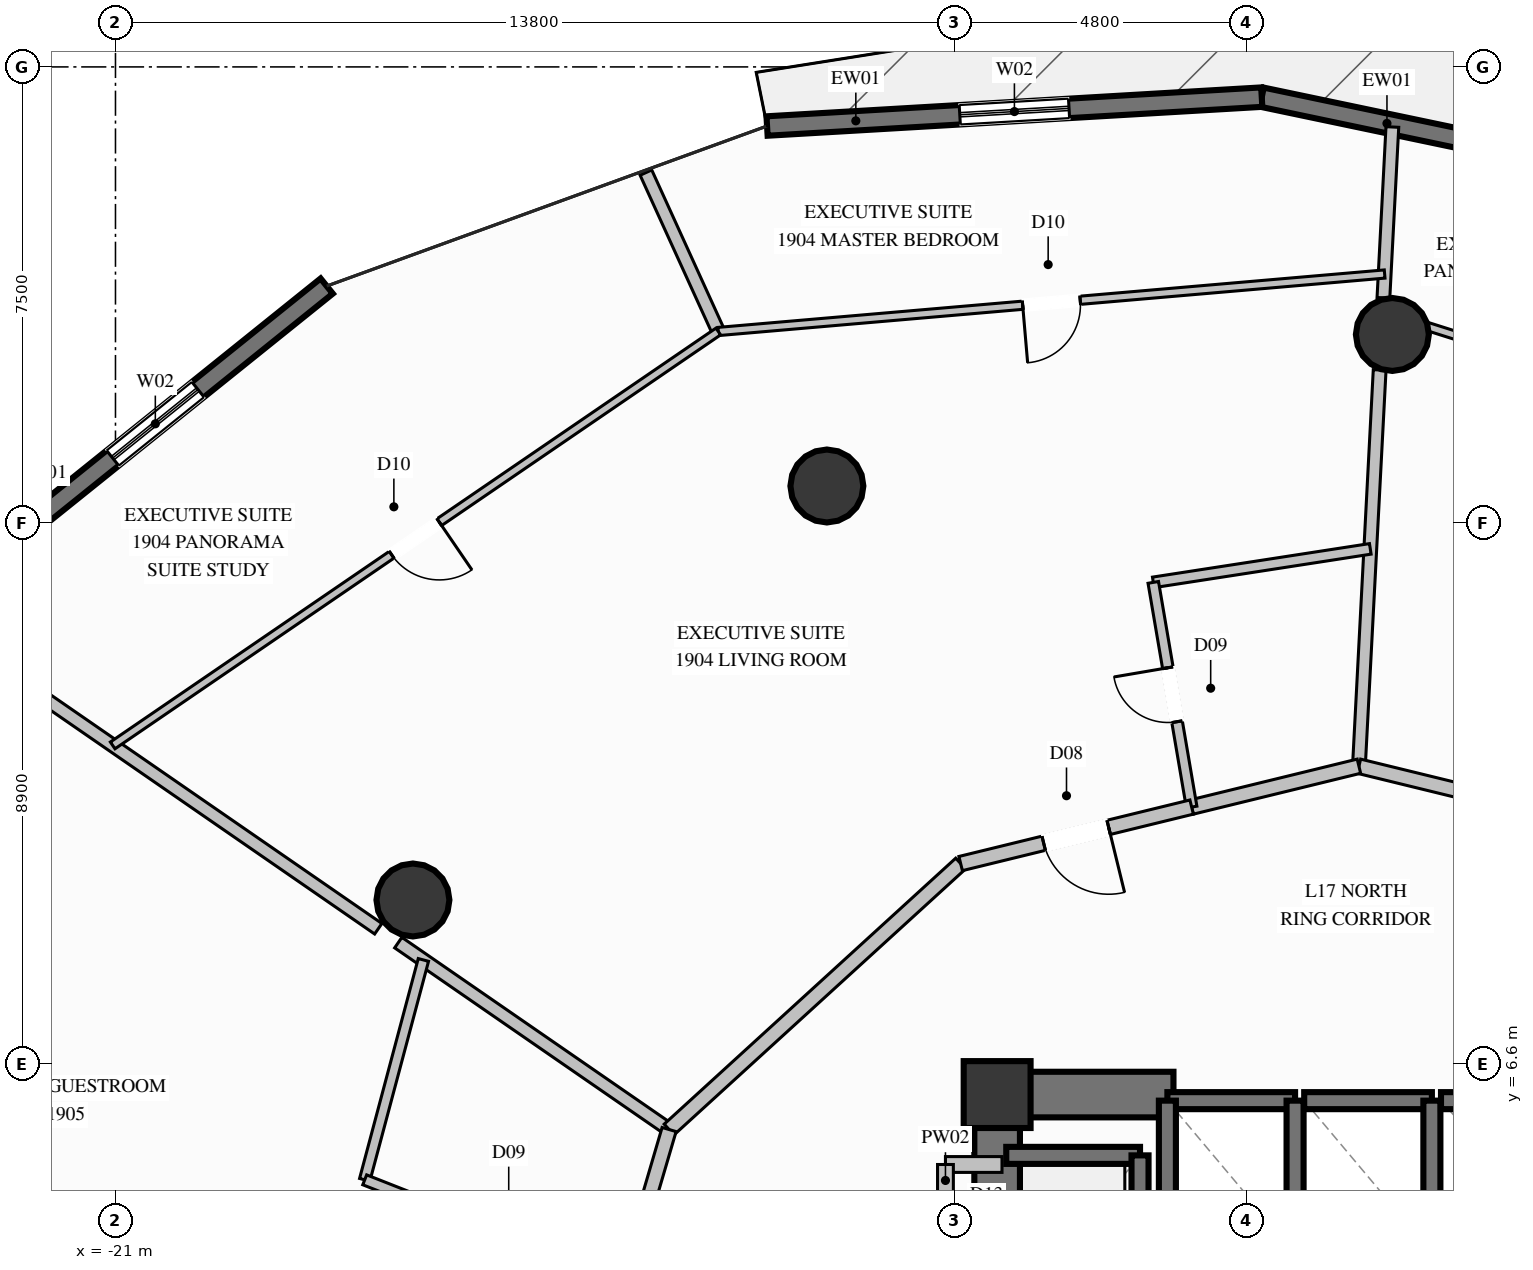
"""IFC4 building model, lengths in metres.
Left out: names, types, materials, properties, quantities, classifications, styles, units other than length and angle.
Written with IfcOpenShell. Run it as: python <this file> out.ifc"""

import sys

from ifc_helpers import new_model, si_unit, direction, frame, frame_2d, origin, origin_2d, place, context, subcontext, project, spatial, rectangle, circle, extrude, element, fill, save


model = new_model("IFC4")
c1 = context("Model", 3, precision=1e-05, world=origin(), true_north=direction((0.0, 1.0)))
c2 = subcontext(c1, "Body", "Model", "MODEL_VIEW")
j1 = project(units=[si_unit("LENGTHUNIT", "METRE"), si_unit("PLANEANGLEUNIT", "RADIAN")], contexts=[c1])
p1 = place(None, origin())
s1 = spatial("IfcSite", under=j1, at=p1, CompositionType="ELEMENT")
p2 = place(p1, origin())
s2 = spatial("IfcBuilding", under=s1, at=p2, CompositionType="ELEMENT")
p3 = place(p2, frame((0.0, 0.0, 71.6)))
s3 = spatial("IfcBuildingStorey", under=s2, at=p3, CompositionType="ELEMENT", Elevation=71.6)
p4 = place(p3, frame((-6.5, 6.1, 0.0), z_axis=(0.0, 0.0, 1.0), x_axis=(1.0, 0.0, 0.0)))
e1 = element("IfcColumn", 1, at=p4, inside=s3, PredefinedType="COLUMN", context=c2, shape_type="SweptSolid", body=[
    extrude(rectangle(XDim=1.1, YDim=1.1, at=origin_2d()), origin(), (0.0, 0.0, 1.0), 3.6),
])
p5 = place(p3, frame((-6.125, 6.1, 0.0), z_axis=(0.0, 0.0, 1.0), x_axis=(1.0, 0.0, 0.0)))
e2 = element("IfcWall", 2, at=p5, inside=s3, PredefinedType="SHEAR", context=c2, shape_type="SweptSolid", body=[
    extrude(rectangle(XDim=2.525, YDim=0.75, at=frame_2d((1.262, 0.0))), origin(), (0.0, 0.0, 1.0), 3.6),
])
p6 = place(p3, frame((-6.5, 2.35, 0.0), z_axis=(0.0, 0.0, 1.0), x_axis=(0.0, 1.0, 0.0)))
e3 = element("IfcWall", 3, at=p6, inside=s3, PredefinedType="SHEAR", context=c2, shape_type="SweptSolid", body=[
    extrude(rectangle(XDim=4.125, YDim=0.75, at=frame_2d((2.062, 0.0))), origin(), (0.0, 0.0, 1.0), 3.6),
])
for number, where, z_axis, x_axis in (
    (4, (0.0, 18.6, 0.0), (0.0, 0.0, 1.0), (1.0, 0.0, 0.0)),
    (5, (-9.3, 16.108, 0.0), (0.0, 0.0, 1.0), (1.0, 0.0, 0.0)),
    (6, (-16.108, 9.3, 0.0), (0.0, 0.0, 1.0), (1.0, 0.0, 0.0)),
):
    element("IfcColumn", number, at=place(p3, frame(where, z_axis=z_axis, x_axis=x_axis)), inside=s3, PredefinedType="COLUMN", context=c2, shape_type="SweptSolid", body=[
        extrude(circle(Radius=0.6, at=origin_2d()), origin(), (0.0, 0.0, 1.0), 3.6),
    ])
p7 = place(p3, frame((-2.148, 22.503, 0.0), z_axis=(0.0, 0.0, 1.0), x_axis=(0.978697953962, -0.205305418609, 0.0)))
e7 = element("IfcWall", 7, at=p7, inside=s3, PredefinedType="SOLIDWALL", context=c2, shape_type="SweptSolid", body=[
    extrude(rectangle(XDim=8.412, YDim=0.32, at=frame_2d((4.206, 0.0))), origin(), (0.0, 0.0, 1.0), 3.34),
])
p8 = place(p7, frame((4.458, 0.0, 0.35)))
e8 = element("IfcOpeningElement", 8, at=p8, cuts=e7, PredefinedType="OPENING", context=c2, shape_type="SweptSolid", body=[
    extrude(rectangle(XDim=1.8, YDim=2.6, at=frame_2d((0.9, 1.3))), frame((0.0, 0.17, 0.0), z_axis=(0.0, -1.0, 0.0), x_axis=(1.0, 0.0, 0.0)), (0.0, 0.0, 1.0), 0.34),
])
p9 = place(p3, frame((-10.284, 22.028, 0.0), z_axis=(0.0, 0.0, 1.0), x_axis=(0.998301126335, 0.058265437081, 0.0)))
e9 = element("IfcWall", 9, at=p9, inside=s3, PredefinedType="SOLIDWALL", context=c2, shape_type="SweptSolid", body=[
    extrude(rectangle(XDim=8.15, YDim=0.32, at=frame_2d((4.075, 0.0))), origin(), (0.0, 0.0, 1.0), 3.34),
])
p10 = place(p9, frame((3.175, 0.0, 0.35)))
e10 = element("IfcOpeningElement", 10, at=p10, cuts=e9, PredefinedType="OPENING", context=c2, shape_type="SweptSolid", body=[
    extrude(rectangle(XDim=1.8, YDim=2.6, at=frame_2d((0.9, 1.3))), frame((0.0, 0.17, 0.0), z_axis=(0.0, -1.0, 0.0), x_axis=(1.0, 0.0, 0.0)), (0.0, 0.0, 1.0), 0.34),
])
p11 = place(p3, frame((-23.164, 14.865, 0.0), z_axis=(0.0, 0.0, 1.0), x_axis=(0.779487156213, 0.626418209585, 0.0)))
e11 = element("IfcWall", 11, at=p11, inside=s3, PredefinedType="SOLIDWALL", context=c2, shape_type="SweptSolid", body=[
    extrude(rectangle(XDim=7.233, YDim=0.32, at=frame_2d((3.617, 0.0))), origin(), (0.0, 0.0, 1.0), 3.34),
])
p12 = place(p11, frame((2.717, 0.0, 0.35)))
e12 = element("IfcOpeningElement", 12, at=p12, cuts=e11, PredefinedType="OPENING", context=c2, shape_type="SweptSolid", body=[
    extrude(rectangle(XDim=1.8, YDim=2.6, at=frame_2d((0.9, 1.3))), frame((0.0, 0.17, 0.0), z_axis=(0.0, -1.0, 0.0), x_axis=(1.0, 0.0, 0.0)), (0.0, 0.0, 1.0), 0.34),
])
p13 = place(p3, frame((-1.6, 6.0, 0.0), z_axis=(0.0, 0.0, 1.0), x_axis=(-1.0, 0.0, 0.0)))
e13 = element("IfcWall", 13, at=p13, inside=s3, PredefinedType="SOLIDWALL", context=c2, shape_type="SweptSolid", body=[
    extrude(rectangle(XDim=2.1, YDim=0.28, at=frame_2d((1.05, 0.0))), origin(), (0.0, 0.0, 1.0), 3.34),
])
for number, where, z_axis, x_axis in (
    (14, (-3.7, 6.0, 0.0), (0.0, 0.0, 1.0), (0.0, -1.0, 0.0)),
    (15, (-1.6, 3.5, 0.0), (0.0, 0.0, 1.0), (0.0, 1.0, 0.0)),
):
    element("IfcWall", number, at=place(p3, frame(where, z_axis=z_axis, x_axis=x_axis)), inside=s3, PredefinedType="SOLIDWALL", context=c2, shape_type="SweptSolid", body=[
        extrude(rectangle(XDim=2.5, YDim=0.28, at=frame_2d((1.25, 0.0))), origin(), (0.0, 0.0, 1.0), 3.34),
    ])
p14 = place(p3, frame((0.65, 6.0, 0.0), z_axis=(0.0, 0.0, 1.0), x_axis=(-1.0, 0.0, 0.0)))
e16 = element("IfcWall", 16, at=p14, inside=s3, PredefinedType="SOLIDWALL", context=c2, shape_type="SweptSolid", body=[
    extrude(rectangle(XDim=2.1, YDim=0.28, at=frame_2d((1.05, 0.0))), origin(), (0.0, 0.0, 1.0), 3.34),
])
p15 = place(p3, frame((0.65, 3.5, 0.0), z_axis=(0.0, 0.0, 1.0), x_axis=(0.0, 1.0, 0.0)))
e17 = element("IfcWall", 17, at=p15, inside=s3, PredefinedType="SOLIDWALL", context=c2, shape_type="SweptSolid", body=[
    extrude(rectangle(XDim=2.5, YDim=0.28, at=frame_2d((1.25, 0.0))), origin(), (0.0, 0.0, 1.0), 3.34),
])
p16 = place(p3, frame((3.0, 6.0, 0.0), z_axis=(0.0, 0.0, 1.0), x_axis=(-1.0, 0.0, 0.0)))
e18 = element("IfcWall", 18, at=p16, inside=s3, PredefinedType="SOLIDWALL", context=c2, shape_type="SweptSolid", body=[
    extrude(rectangle(XDim=2.2, YDim=0.28, at=frame_2d((1.1, 0.0))), origin(), (0.0, 0.0, 1.0), 3.34),
])
p17 = place(p3, frame((-4.15, 5.1, 0.0), z_axis=(0.0, 0.0, 1.0), x_axis=(-1.0, 0.0, 0.0)))
e19 = element("IfcWall", 19, at=p17, inside=s3, PredefinedType="SOLIDWALL", context=c2, shape_type="SweptSolid", body=[
    extrude(rectangle(XDim=2.2, YDim=0.28, at=frame_2d((1.1, 0.0))), origin(), (0.0, 0.0, 1.0), 3.34),
])
p18 = place(p3, frame((-4.15, 2.4, 0.0), z_axis=(0.0, 0.0, 1.0), x_axis=(0.0, 1.0, 0.0)))
e20 = element("IfcWall", 20, at=p18, inside=s3, PredefinedType="SOLIDWALL", context=c2, shape_type="SweptSolid", body=[
    extrude(rectangle(XDim=2.7, YDim=0.28, at=frame_2d((1.35, 0.0))), origin(), (0.0, 0.0, 1.0), 3.34),
])
p19 = place(p3, frame((-7.35, 4.95, 0.0), z_axis=(0.0, 0.0, 1.0), x_axis=(1.0, 0.0, 0.0)))
e21 = element("IfcWall", 21, at=p19, inside=s3, PredefinedType="PARTITIONING", context=c2, shape_type="SweptSolid", body=[
    extrude(rectangle(XDim=0.93, YDim=0.26, at=frame_2d((0.465, 0.0))), origin(), (0.0, 0.0, 1.0), 3.34),
])
p20 = place(p3, frame((-7.35, 2.55, 0.0), z_axis=(0.0, 0.0, 1.0), x_axis=(0.0, 1.0, 0.0)))
e22 = element("IfcWall", 22, at=p20, inside=s3, PredefinedType="PARTITIONING", context=c2, shape_type="SweptSolid", body=[
    extrude(rectangle(XDim=2.4, YDim=0.26, at=frame_2d((1.2, 0.0))), origin(), (0.0, 0.0, 1.0), 2.425),
])
p21 = place(p20, frame((0.775, 0.0, 0.0)))
e23 = element("IfcOpeningElement", 23, at=p21, cuts=e22, PredefinedType="OPENING", context=c2, shape_type="SweptSolid", body=[
    extrude(rectangle(XDim=0.85, YDim=2.05, at=frame_2d((0.425, 1.025))), frame((0.0, 0.14, 0.0), z_axis=(0.0, -1.0, 0.0), x_axis=(1.0, 0.0, 0.0)), (0.0, 0.0, 1.0), 0.28),
])
p22 = place(p3, frame((-0.55, 11.5, 0.0), z_axis=(0.0, 0.0, 1.0), x_axis=(0.052270148933, 0.998632981395, 0.0)))
e24 = element("IfcWall", 24, at=p22, inside=s3, PredefinedType="PARTITIONING", context=c2, shape_type="SweptSolid", body=[
    extrude(rectangle(XDim=6.525, YDim=0.21, at=frame_2d((3.263, 0.0))), origin(), (0.0, 0.0, 1.0), 3.34),
])
p23 = place(p3, frame((-0.147, 19.202, 0.0), z_axis=(0.0, 0.0, 1.0), x_axis=(0.052230954764, 0.998635032114, 0.0)))
e25 = element("IfcWall", 25, at=p23, inside=s3, PredefinedType="PARTITIONING", context=c2, shape_type="SweptSolid", body=[
    extrude(rectangle(XDim=2.814, YDim=0.21, at=frame_2d((1.407, 0.0))), origin(), (0.0, 0.0, 1.0), 3.34),
])
p24 = place(p3, frame((-11.895, 5.525, 0.0), z_axis=(0.0, 0.0, 1.0), x_axis=(-0.823003351356, 0.56803651613, 0.0)))
e26 = element("IfcWall", 26, at=p24, inside=s3, PredefinedType="PARTITIONING", context=c2, shape_type="SweptSolid", body=[
    extrude(rectangle(XDim=5.412, YDim=0.21, at=frame_2d((2.706, 0.0))), origin(), (0.0, 0.0, 1.0), 3.34),
])
p25 = place(p3, frame((-16.678, 8.827, 0.0), z_axis=(0.0, 0.0, 1.0), x_axis=(-0.822952332907, 0.568110427437, 0.0)))
e27 = element("IfcWall", 27, at=p25, inside=s3, PredefinedType="PARTITIONING", context=c2, shape_type="SweptSolid", body=[
    extrude(rectangle(XDim=8.629, YDim=0.21, at=frame_2d((4.314, 0.0))), origin(), (0.0, 0.0, 1.0), 3.34),
])
p26 = place(p3, frame((6.0, 9.899, 0.0), z_axis=(0.0, 0.0, 1.0), x_axis=(-0.971400676792, 0.237446257348, 0.0)))
e28 = element("IfcWall", 28, at=p26, inside=s3, PredefinedType="PARTITIONING", context=c2, shape_type="SweptSolid", body=[
    extrude(rectangle(XDim=6.743, YDim=0.24, at=frame_2d((3.372, 0.0))), origin(), (0.0, 0.0, 1.0), 2.917),
])
p27 = place(p3, frame((9.303, 15.97, 0.0), z_axis=(0.0, 0.0, 1.0), x_axis=(-0.953412993278, 0.301668135953, 0.0)))
e29 = element("IfcWall", 29, at=p27, inside=s3, PredefinedType="PARTITIONING", context=c2, shape_type="SweptSolid", body=[
    extrude(rectangle(XDim=9.925, YDim=0.135, at=frame_2d((4.963, 0.0))), origin(), (0.0, 0.0, 1.0), 2.793),
])
p28 = place(p27, frame((4.488, 0.0, 0.0)))
e30 = element("IfcOpeningElement", 30, at=p28, cuts=e29, PredefinedType="OPENING", context=c2, shape_type="SweptSolid", body=[
    extrude(rectangle(XDim=0.95, YDim=2.1, at=frame_2d((0.475, 1.05))), frame((0.0, 0.078, 0.0), z_axis=(0.0, -1.0, 0.0), x_axis=(1.0, 0.0, 0.0)), (0.0, 0.0, 1.0), 0.155),
])
p29 = place(p3, frame((-0.55, 11.5, 0.0), z_axis=(0.0, 0.0, 1.0), x_axis=(-0.971426839663, -0.237339198579, 0.0)))
e31 = element("IfcWall", 31, at=p29, inside=s3, PredefinedType="PARTITIONING", context=c2, shape_type="SweptSolid", body=[
    extrude(rectangle(XDim=2.832, YDim=0.24, at=frame_2d((1.416, 0.0))), origin(), (0.0, 0.0, 1.0), 2.917),
])
p30 = place(p3, frame((-0.363, 15.074, 0.0), z_axis=(0.0, 0.0, 1.0), x_axis=(-0.988289486539, -0.152590598654, 0.0)))
e32 = element("IfcWall", 32, at=p30, inside=s3, PredefinedType="PLUMBINGWALL", context=c2, shape_type="SweptSolid", body=[
    extrude(rectangle(XDim=3.611, YDim=0.175, at=frame_2d((1.806, 0.0))), origin(), (0.0, 0.0, 1.0), 3.34),
])
p31 = place(p3, frame((-3.301, 10.828, 0.0), z_axis=(0.0, 0.0, 1.0), x_axis=(-0.168294919358, 0.985736689039, 0.0)))
e33 = element("IfcWall", 33, at=p31, inside=s3, PredefinedType="PLUMBINGWALL", context=c2, shape_type="SweptSolid", body=[
    extrude(rectangle(XDim=3.749, YDim=0.175, at=frame_2d((1.874, 0.0))), origin(), (0.0, 0.0, 1.0), 3.34),
])
p32 = place(p31, frame((1.424, 0.0, 0.0)))
e34 = element("IfcOpeningElement", 34, at=p32, cuts=e33, PredefinedType="OPENING", context=c2, shape_type="SweptSolid", body=[
    extrude(rectangle(XDim=0.9, YDim=2.1, at=frame_2d((0.45, 1.05))), frame((0.0, 0.098, 0.0), z_axis=(0.0, -1.0, 0.0), x_axis=(1.0, 0.0, 0.0)), (0.0, 0.0, 1.0), 0.195),
])
p33 = place(p3, frame((-11.086, 18.649, 0.0), z_axis=(0.0, 0.0, 1.0), x_axis=(-0.414437075806, 0.910077969296, 0.0)))
e35 = element("IfcWall", 35, at=p33, inside=s3, PredefinedType="PARTITIONING", context=c2, shape_type="SweptSolid", body=[
    extrude(rectangle(XDim=2.871, YDim=0.21, at=frame_2d((1.436, 0.0))), origin(), (0.0, 0.0, 1.0), 3.34),
])
p34 = place(p3, frame((-7.1, 9.899, 0.0), z_axis=(0.0, 0.0, 1.0), x_axis=(-0.73878836807, -0.673937495028, 0.0)))
e36 = element("IfcWall", 36, at=p34, inside=s3, PredefinedType="PARTITIONING", context=c2, shape_type="SweptSolid", body=[
    extrude(rectangle(XDim=6.49, YDim=0.24, at=frame_2d((3.245, 0.0))), origin(), (0.0, 0.0, 1.0), 3.34),
])
p35 = place(p3, frame((-3.301, 10.828, 0.0), z_axis=(0.0, 0.0, 1.0), x_axis=(-0.971381725301, -0.237523775128, 0.0)))
e37 = element("IfcWall", 37, at=p35, inside=s3, PredefinedType="PARTITIONING", context=c2, shape_type="SweptSolid", body=[
    extrude(rectangle(XDim=3.911, YDim=0.24, at=frame_2d((1.956, 0.0))), origin(), (0.0, 0.0, 1.0), 3.34),
])
p36 = place(p35, frame((1.405, 0.0, 0.0)))
e38 = element("IfcOpeningElement", 38, at=p36, cuts=e37, PredefinedType="OPENING", context=c2, shape_type="SweptSolid", body=[
    extrude(rectangle(XDim=1.1, YDim=2.3, at=frame_2d((0.55, 1.15))), frame((0.0, 0.13, 0.0), z_axis=(0.0, -1.0, 0.0), x_axis=(1.0, 0.0, 0.0)), (0.0, 0.0, 1.0), 0.26),
])
p37 = place(p3, frame((-0.127, 19.594, 0.0), z_axis=(0.0, 0.0, 1.0), x_axis=(-0.99630221434, -0.085917970765, 0.0)))
e39 = element("IfcWall", 39, at=p37, inside=s3, PredefinedType="PARTITIONING", context=c2, shape_type="SweptSolid", body=[
    extrude(rectangle(XDim=11.0, YDim=0.135, at=frame_2d((5.5, 0.0))), origin(), (0.0, 0.0, 1.0), 3.34),
])
p38 = place(p37, frame((5.025, 0.0, 0.0)))
e40 = element("IfcOpeningElement", 40, at=p38, cuts=e39, PredefinedType="OPENING", context=c2, shape_type="SweptSolid", body=[
    extrude(rectangle(XDim=0.95, YDim=2.1, at=frame_2d((0.475, 1.05))), frame((0.0, 0.078, 0.0), z_axis=(0.0, -1.0, 0.0), x_axis=(1.0, 0.0, 0.0)), (0.0, 0.0, 1.0), 0.155),
])
p39 = place(p3, frame((-11.086, 18.649, 0.0), z_axis=(0.0, 0.0, 1.0), x_axis=(-0.825609445558, -0.564242007834, 0.0)))
e41 = element("IfcWall", 41, at=p39, inside=s3, PredefinedType="PARTITIONING", context=c2, shape_type="SweptSolid", body=[
    extrude(rectangle(XDim=12.064, YDim=0.135, at=frame_2d((6.032, 0.0))), origin(), (0.0, 0.0, 1.0), 3.34),
])
p40 = place(p39, frame((5.557, 0.0, 0.0)))
e42 = element("IfcOpeningElement", 42, at=p40, cuts=e41, PredefinedType="OPENING", context=c2, shape_type="SweptSolid", body=[
    extrude(rectangle(XDim=0.95, YDim=2.1, at=frame_2d((0.475, 1.05))), frame((0.0, 0.078, 0.0), z_axis=(0.0, -1.0, 0.0), x_axis=(1.0, 0.0, 0.0)), (0.0, 0.0, 1.0), 0.155),
])
p41 = place(p3, frame((-11.895, 5.525, 0.0), z_axis=(0.0, 0.0, 1.0), x_axis=(-0.281878178616, -0.9594502032, 0.0)))
e43 = element("IfcWall", 43, at=p41, inside=s3, PredefinedType="PARTITIONING", context=c2, shape_type="SweptSolid", body=[
    extrude(rectangle(XDim=2.615, YDim=0.24, at=frame_2d((1.307, 0.0))), origin(), (0.0, 0.0, 1.0), 3.34),
])
p42 = place(p3, frame((-15.936, 8.314, 0.0), z_axis=(0.0, 0.0, 1.0), x_axis=(-0.257808817377, -0.966195949941, 0.0)))
e44 = element("IfcWall", 44, at=p42, inside=s3, PredefinedType="PLUMBINGWALL", context=c2, shape_type="SweptSolid", body=[
    extrude(rectangle(XDim=3.742, YDim=0.175, at=frame_2d((1.871, 0.0))), origin(), (0.0, 0.0, 1.0), 2.793),
])
p43 = place(p3, frame((-12.632, 3.016, 0.0), z_axis=(0.0, 0.0, 1.0), x_axis=(-0.930390795805, 0.366569184576, 0.0)))
e45 = element("IfcWall", 45, at=p43, inside=s3, PredefinedType="PLUMBINGWALL", context=c2, shape_type="SweptSolid", body=[
    extrude(rectangle(XDim=4.588, YDim=0.175, at=frame_2d((2.294, 0.0))), origin(), (0.0, 0.0, 1.0), 3.34),
])
p44 = place(p43, frame((1.844, 0.0, 0.0)))
e46 = element("IfcOpeningElement", 46, at=p44, cuts=e45, PredefinedType="OPENING", context=c2, shape_type="SweptSolid", body=[
    extrude(rectangle(XDim=0.9, YDim=2.1, at=frame_2d((0.45, 1.05))), frame((0.0, 0.098, 0.0), z_axis=(0.0, -1.0, 0.0), x_axis=(1.0, 0.0, 0.0)), (0.0, 0.0, 1.0), 0.195),
])
p45 = place(p10, origin())
e47 = element("IfcWindow", 47, at=p45, inside=s3, PartitioningType="SINGLE_PANEL", PredefinedType="WINDOW", context=c2, shape_type="SweptSolid", body=[
    extrude(rectangle(XDim=1.8, YDim=2.6, at=frame_2d((0.9, 1.3))), frame((0.0, 0.03, 0.0), z_axis=(0.0, -1.0, 0.0), x_axis=(1.0, 0.0, 0.0)), (0.0, 0.0, 1.0), 0.06),
])
fill(e10, e47)
p46 = place(p12, origin())
e48 = element("IfcWindow", 48, at=p46, inside=s3, PartitioningType="SINGLE_PANEL", PredefinedType="WINDOW", context=c2, shape_type="SweptSolid", body=[
    extrude(rectangle(XDim=1.8, YDim=2.6, at=frame_2d((0.9, 1.3))), frame((0.0, 0.03, 0.0), z_axis=(0.0, -1.0, 0.0), x_axis=(1.0, 0.0, 0.0)), (0.0, 0.0, 1.0), 0.06),
])
fill(e12, e48)
p47 = place(p32, origin())
e49 = element("IfcDoor", 49, at=p47, inside=s3, OperationType="SINGLE_SWING_RIGHT", PredefinedType="DOOR", context=c2, shape_type="SweptSolid", body=[
    extrude(rectangle(XDim=0.9, YDim=2.1, at=frame_2d((0.45, 1.05))), frame((0.0, 0.025, 0.0), z_axis=(0.0, -1.0, 0.0), x_axis=(1.0, 0.0, 0.0)), (0.0, 0.0, 1.0), 0.05),
])
fill(e34, e49)
p48 = place(p36, origin())
e50 = element("IfcDoor", 50, at=p48, inside=s3, OperationType="SINGLE_SWING_LEFT", PredefinedType="DOOR", context=c2, shape_type="SweptSolid", body=[
    extrude(rectangle(XDim=1.1, YDim=2.3, at=frame_2d((0.55, 1.15))), frame((0.0, 0.025, 0.0), z_axis=(0.0, -1.0, 0.0), x_axis=(1.0, 0.0, 0.0)), (0.0, 0.0, 1.0), 0.05),
])
fill(e38, e50)
p49 = place(p38, origin())
e51 = element("IfcDoor", 51, at=p49, inside=s3, OperationType="SINGLE_SWING_RIGHT", PredefinedType="DOOR", context=c2, shape_type="SweptSolid", body=[
    extrude(rectangle(XDim=0.95, YDim=2.1, at=frame_2d((0.475, 1.05))), frame((0.0, 0.025, 0.0), z_axis=(0.0, -1.0, 0.0), x_axis=(1.0, 0.0, 0.0)), (0.0, 0.0, 1.0), 0.05),
])
fill(e40, e51)
p50 = place(p40, origin())
e52 = element("IfcDoor", 52, at=p50, inside=s3, OperationType="SINGLE_SWING_LEFT", PredefinedType="DOOR", context=c2, shape_type="SweptSolid", body=[
    extrude(rectangle(XDim=0.95, YDim=2.1, at=frame_2d((0.475, 1.05))), frame((0.0, 0.025, 0.0), z_axis=(0.0, -1.0, 0.0), x_axis=(1.0, 0.0, 0.0)), (0.0, 0.0, 1.0), 0.05),
])
fill(e42, e52)
save(model, sys.argv[1])
